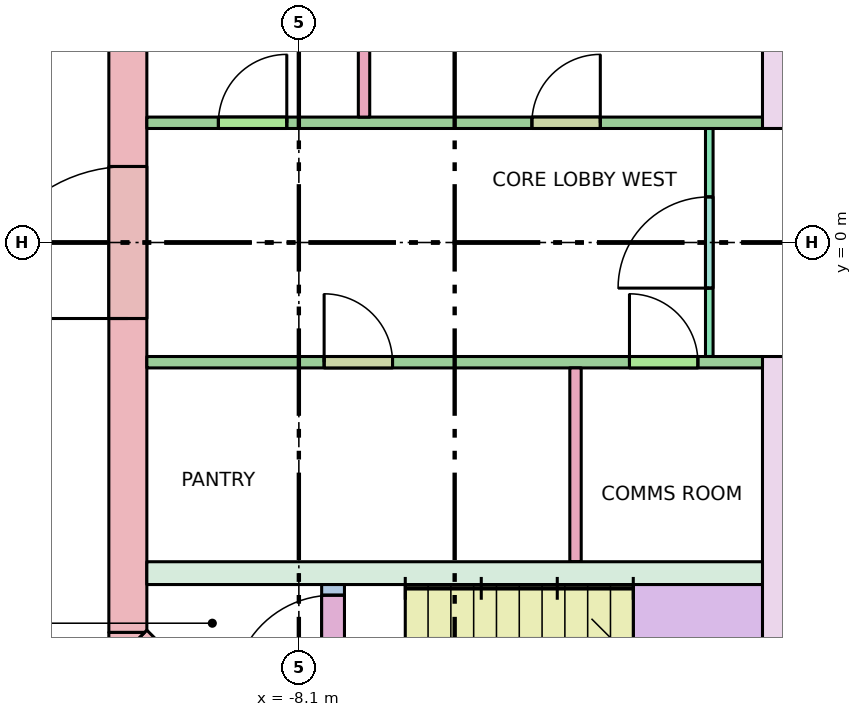
"""IFC4 building model, lengths in metres.
Left out: names, types, materials, properties, quantities, classifications, styles, units other than length and angle.
Written with IfcOpenShell. Run it as: python <this file> out.ifc"""

import sys

from ifc_helpers import new_model, si_unit, direction, frame, frame_2d, origin, place, context, subcontext, project, spatial, polyline, rectangle, outline, extrude, element, fill, save


model = new_model("IFC4")
c1 = context("Model", 3, precision=1e-05, world=origin(), true_north=direction((0.0, 1.0)))
c2 = subcontext(c1, "Body", "Model", "MODEL_VIEW")
j1 = project(units=[si_unit("LENGTHUNIT", "METRE"), si_unit("PLANEANGLEUNIT", "RADIAN")], contexts=[c1])
p1 = place(None, origin())
s1 = spatial("IfcSite", under=j1, at=p1, CompositionType="ELEMENT")
p2 = place(p1, origin())
s2 = spatial("IfcBuilding", under=s1, at=p2, CompositionType="ELEMENT")
p3 = place(p2, frame((0.0, 0.0, 264.9)))
s3 = spatial("IfcBuildingStorey", under=s2, at=p3, CompositionType="ELEMENT", Elevation=264.9)
p4 = place(p3, frame((-10.35, -5.13, -0.28), z_axis=(0.0, 0.0, 1.0), x_axis=(0.0, 1.0, 0.0)))
e1 = element("IfcWall", 1, at=p4, inside=s3, PredefinedType="SHEAR", context=c2, shape_type="SweptSolid", body=[
    extrude(rectangle(XDim=10.26, YDim=0.5, at=frame_2d((5.13, 0.0))), origin(), (0.0, 0.0, 1.0), 3.7),
])
p5 = place(p4, frame((4.13, 0.0, 0.28)))
e2 = element("IfcOpeningElement", 2, at=p5, cuts=e1, PredefinedType="OPENING", context=c2, shape_type="SweptSolid", body=[
    extrude(rectangle(XDim=2.0, YDim=2.1, at=frame_2d((1.0, 1.05))), frame((0.0, 0.26, 0.0), z_axis=(0.0, -1.0, 0.0), x_axis=(1.0, 0.0, 0.0)), (0.0, 0.0, 1.0), 0.52),
])
p6 = place(p3, frame((-7.277, -8.277, -0.28), z_axis=(0.0, 0.0, 1.0), x_axis=(-0.707106781187, 0.707106781187, 0.0)))
e3 = element("IfcWall", 3, at=p6, inside=s3, PredefinedType="SHEAR", context=c2, shape_type="SweptSolid", body=[
    extrude(rectangle(XDim=4.243, YDim=0.5, at=frame_2d((2.121, 0.0))), origin(), (0.0, 0.0, 1.0), 3.7),
])
p7 = place(p6, frame((2.393, 0.0, 0.28)))
e4 = element("IfcOpeningElement", 4, at=p7, cuts=e3, PredefinedType="OPENING", context=c2, shape_type="SweptSolid", body=[
    extrude(rectangle(XDim=1.2, YDim=2.1, at=frame_2d((0.6, 1.05))), frame((0.0, 0.26, 0.0), z_axis=(0.0, -1.0, 0.0), x_axis=(1.0, 0.0, 0.0)), (0.0, 0.0, 1.0), 0.52),
])
p8 = place(p3, frame((0.0, 0.0, -0.28)))
e5 = element("IfcWall", 5, at=p8, inside=s3, PredefinedType="SHEAR", context=c2, shape_type="SweptSolid", body=[
    extrude(outline(polyline([(-10.6, -5.307), (-10.6, -5.13), (-10.13, -5.13), (-10.454, -5.454), (-10.6, -5.307)])), origin(), (0.0, 0.0, 1.0), 3.7),
])
p9 = place(p3, frame((-10.1, -4.35, 0.0), z_axis=(0.0, 0.0, 1.0), x_axis=(1.0, 0.0, 0.0)))
e6 = element("IfcWall", 6, at=p9, inside=s3, PredefinedType="SOLIDWALL", context=c2, shape_type="SweptSolid", body=[
    extrude(rectangle(XDim=8.1, YDim=0.3, at=frame_2d((4.05, 0.0))), origin(), (0.0, 0.0, 1.0), 3.42),
])
for number, where, z_axis, x_axis in (
    (7, (-1.85, 1.5, 0.0), (0.0, 0.0, 1.0), (0.0, 1.0, 0.0)),
    (8, (-1.85, -8.1, 0.0), (0.0, 0.0, 1.0), (0.0, 1.0, 0.0)),
):
    element("IfcWall", number, at=place(p3, frame(where, z_axis=z_axis, x_axis=x_axis)), inside=s3, PredefinedType="SHEAR", context=c2, shape_type="SweptSolid", body=[
        extrude(rectangle(XDim=6.6, YDim=0.3, at=frame_2d((3.3, 0.0))), origin(), (0.0, 0.0, 1.0), 3.42),
    ])
p10 = place(p3, frame((-7.65, -7.64, 0.0), z_axis=(0.0, 0.0, 1.0), x_axis=(0.0, 1.0, 0.0)))
e9 = element("IfcWall", 9, at=p10, inside=s3, PredefinedType="SHEAR", context=c2, shape_type="SweptSolid", body=[
    extrude(rectangle(XDim=3.14, YDim=0.3, at=frame_2d((1.57, 0.0))), origin(), (0.0, 0.0, 1.0), 3.42),
])
p11 = place(p10, frame((1.68, 0.0, 0.0)))
e10 = element("IfcOpeningElement", 10, at=p11, cuts=e9, PredefinedType="OPENING", context=c2, shape_type="SweptSolid", body=[
    extrude(rectangle(XDim=1.32, YDim=2.1, at=frame_2d((0.66, 1.05))), frame((0.0, 0.16, 0.0), z_axis=(0.0, -1.0, 0.0), x_axis=(1.0, 0.0, 0.0)), (0.0, 0.0, 1.0), 0.32),
])
p12 = place(p3, frame((-2.7, -1.5, 0.0), z_axis=(0.0, 0.0, 1.0), x_axis=(0.0, 1.0, 0.0)))
e11 = element("IfcWall", 11, at=p12, inside=s3, PredefinedType="PARTITIONING", context=c2, shape_type="SweptSolid", body=[
    extrude(rectangle(XDim=3.0, YDim=0.1, at=frame_2d((1.5, 0.0))), origin(), (0.0, 0.0, 1.0), 3.42),
])
p13 = place(p12, frame((0.9, 0.0, 0.0)))
e12 = element("IfcOpeningElement", 12, at=p13, cuts=e11, PredefinedType="OPENING", context=c2, shape_type="SweptSolid", body=[
    extrude(rectangle(XDim=1.2, YDim=2.1, at=frame_2d((0.6, 1.05))), frame((0.0, 0.06, 0.0), z_axis=(0.0, -1.0, 0.0), x_axis=(1.0, 0.0, 0.0)), (0.0, 0.0, 1.0), 0.12),
])
for number, where, z_axis, x_axis in (
    (13, (-7.242, 1.65, 0.0), (0.0, 0.0, 1.0), (0.0, 1.0, 0.0)),
    (14, (-4.46, -4.2, 0.0), (0.0, 0.0, 1.0), (0.0, 1.0, 0.0)),
):
    element("IfcWall", number, at=place(p3, frame(where, z_axis=z_axis, x_axis=x_axis)), inside=s3, PredefinedType="PARTITIONING", context=c2, shape_type="SweptSolid", body=[
        extrude(rectangle(XDim=2.55, YDim=0.15, at=frame_2d((1.275, 0.0))), origin(), (0.0, 0.0, 1.0), 3.42),
    ])
p14 = place(p3, frame((-10.1, 1.575, 0.0), z_axis=(0.0, 0.0, 1.0), x_axis=(1.0, 0.0, 0.0)))
e15 = element("IfcWall", 15, at=p14, inside=s3, PredefinedType="PARTITIONING", context=c2, shape_type="SweptSolid", body=[
    extrude(rectangle(XDim=8.1, YDim=0.15, at=frame_2d((4.05, 0.0))), origin(), (0.0, 0.0, 1.0), 3.42),
])
p15 = place(p14, frame((0.941, 0.0, 0.0)))
e16 = element("IfcOpeningElement", 16, at=p15, cuts=e15, PredefinedType="OPENING", context=c2, shape_type="SweptSolid", body=[
    extrude(rectangle(XDim=0.9, YDim=2.1, at=frame_2d((0.45, 1.05))), frame((0.0, 0.085, 0.0), z_axis=(0.0, -1.0, 0.0), x_axis=(1.0, 0.0, 0.0)), (0.0, 0.0, 1.0), 0.17),
])
p16 = place(p14, frame((5.066, 0.0, 0.0)))
e17 = element("IfcOpeningElement", 17, at=p16, cuts=e15, PredefinedType="OPENING", context=c2, shape_type="SweptSolid", body=[
    extrude(rectangle(XDim=0.9, YDim=2.1, at=frame_2d((0.45, 1.05))), frame((0.0, 0.085, 0.0), z_axis=(0.0, -1.0, 0.0), x_axis=(1.0, 0.0, 0.0)), (0.0, 0.0, 1.0), 0.17),
])
p17 = place(p3, frame((-10.1, -1.575, 0.0), z_axis=(0.0, 0.0, 1.0), x_axis=(1.0, 0.0, 0.0)))
e18 = element("IfcWall", 18, at=p17, inside=s3, PredefinedType="PARTITIONING", context=c2, shape_type="SweptSolid", body=[
    extrude(rectangle(XDim=8.1, YDim=0.15, at=frame_2d((4.05, 0.0))), origin(), (0.0, 0.0, 1.0), 3.42),
])
p18 = place(p17, frame((2.333, 0.0, 0.0)))
e19 = element("IfcOpeningElement", 19, at=p18, cuts=e18, PredefinedType="OPENING", context=c2, shape_type="SweptSolid", body=[
    extrude(rectangle(XDim=0.9, YDim=2.1, at=frame_2d((0.45, 1.05))), frame((0.0, 0.085, 0.0), z_axis=(0.0, -1.0, 0.0), x_axis=(1.0, 0.0, 0.0)), (0.0, 0.0, 1.0), 0.17),
])
p19 = place(p17, frame((6.35, 0.0, 0.0)))
e20 = element("IfcOpeningElement", 20, at=p19, cuts=e18, PredefinedType="OPENING", context=c2, shape_type="SweptSolid", body=[
    extrude(rectangle(XDim=0.9, YDim=2.1, at=frame_2d((0.45, 1.05))), frame((0.0, 0.085, 0.0), z_axis=(0.0, -1.0, 0.0), x_axis=(1.0, 0.0, 0.0)), (0.0, 0.0, 1.0), 0.17),
])
p20 = place(p11, origin())
e21 = element("IfcDoor", 21, at=p20, inside=s3, OperationType="DOUBLE_DOOR_SINGLE_SWING", PredefinedType="DOOR", context=c2, shape_type="SweptSolid", body=[
    extrude(rectangle(XDim=1.32, YDim=2.1, at=frame_2d((0.66, 1.05))), frame((0.0, 0.025, 0.0), z_axis=(0.0, -1.0, 0.0), x_axis=(1.0, 0.0, 0.0)), (0.0, 0.0, 1.0), 0.05),
])
fill(e10, e21)
p21 = place(p5, origin())
e22 = element("IfcDoor", 22, at=p21, inside=s3, OperationType="DOUBLE_DOOR_SINGLE_SWING", PredefinedType="DOOR", context=c2, shape_type="SweptSolid", body=[
    extrude(rectangle(XDim=2.0, YDim=2.1, at=frame_2d((1.0, 1.05))), frame((0.0, 0.025, 0.0), z_axis=(0.0, -1.0, 0.0), x_axis=(1.0, 0.0, 0.0)), (0.0, 0.0, 1.0), 0.05),
])
fill(e2, e22)
p22 = place(p13, origin())
e23 = element("IfcDoor", 23, at=p22, inside=s3, OperationType="SINGLE_SWING_LEFT", PredefinedType="DOOR", context=c2, shape_type="SweptSolid", body=[
    extrude(rectangle(XDim=1.2, YDim=2.1, at=frame_2d((0.6, 1.05))), frame((0.0, 0.025, 0.0), z_axis=(0.0, -1.0, 0.0), x_axis=(1.0, 0.0, 0.0)), (0.0, 0.0, 1.0), 0.05),
])
fill(e12, e23)
p23 = place(p15, origin())
e24 = element("IfcDoor", 24, at=p23, inside=s3, OperationType="SINGLE_SWING_RIGHT", PredefinedType="DOOR", context=c2, shape_type="SweptSolid", body=[
    extrude(rectangle(XDim=0.9, YDim=2.1, at=frame_2d((0.45, 1.05))), frame((0.0, 0.025, 0.0), z_axis=(0.0, -1.0, 0.0), x_axis=(1.0, 0.0, 0.0)), (0.0, 0.0, 1.0), 0.05),
])
fill(e16, e24)
p24 = place(p16, origin())
e25 = element("IfcDoor", 25, at=p24, inside=s3, OperationType="SINGLE_SWING_RIGHT", PredefinedType="DOOR", context=c2, shape_type="SweptSolid", body=[
    extrude(rectangle(XDim=0.9, YDim=2.1, at=frame_2d((0.45, 1.05))), frame((0.0, 0.025, 0.0), z_axis=(0.0, -1.0, 0.0), x_axis=(1.0, 0.0, 0.0)), (0.0, 0.0, 1.0), 0.05),
])
fill(e17, e25)
p25 = place(p18, origin())
e26 = element("IfcDoor", 26, at=p25, inside=s3, OperationType="SINGLE_SWING_LEFT", PredefinedType="DOOR", context=c2, shape_type="SweptSolid", body=[
    extrude(rectangle(XDim=0.9, YDim=2.1, at=frame_2d((0.45, 1.05))), frame((0.0, 0.025, 0.0), z_axis=(0.0, -1.0, 0.0), x_axis=(1.0, 0.0, 0.0)), (0.0, 0.0, 1.0), 0.05),
])
fill(e19, e26)
p26 = place(p19, origin())
e27 = element("IfcDoor", 27, at=p26, inside=s3, OperationType="SINGLE_SWING_LEFT", PredefinedType="DOOR", context=c2, shape_type="SweptSolid", body=[
    extrude(rectangle(XDim=0.9, YDim=2.1, at=frame_2d((0.45, 1.05))), frame((0.0, 0.025, 0.0), z_axis=(0.0, -1.0, 0.0), x_axis=(1.0, 0.0, 0.0)), (0.0, 0.0, 1.0), 0.05),
])
fill(e20, e27)
save(model, sys.argv[1])
